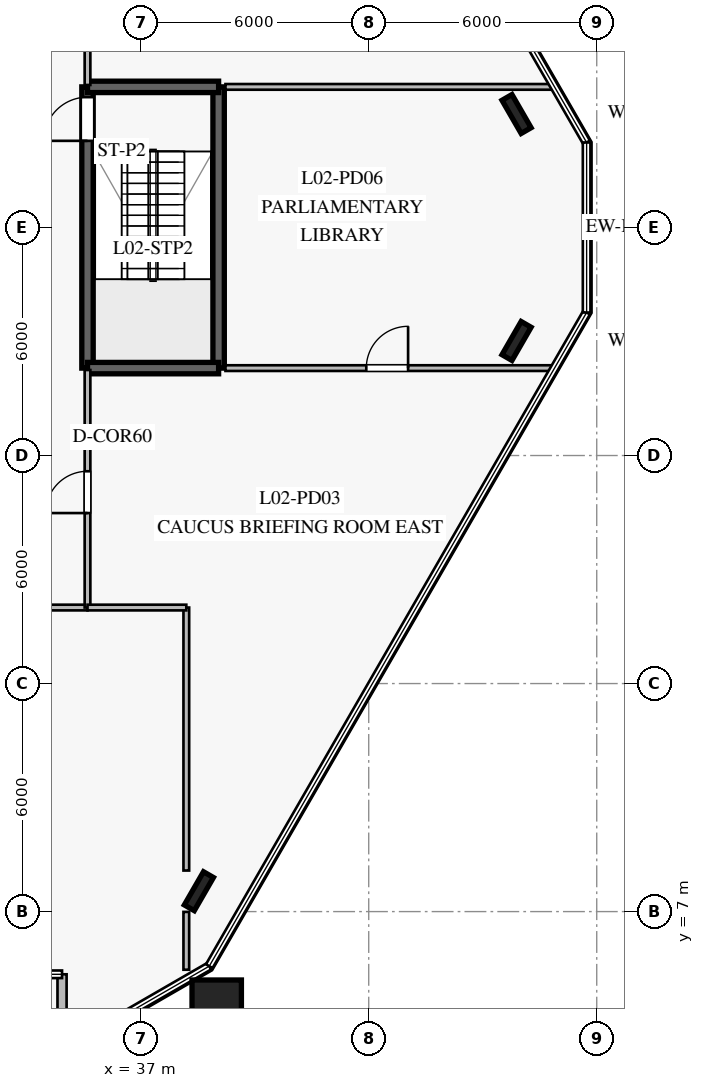
"""IFC4 building model, lengths in metres.
Left out: names, types, materials, properties, quantities, classifications, styles, units other than length and angle.
Written with IfcOpenShell. Run it as: python <this file> out.ifc"""

import sys

from ifc_helpers import new_model, si_unit, direction, frame, frame_2d, origin, origin_2d, place, context, subcontext, project, spatial, rectangle, i_section, extrude, element, fill, save


model = new_model("IFC4")
c1 = context("Model", 3, precision=1e-05, world=origin(), true_north=direction((0.0, 1.0)))
c2 = subcontext(c1, "Body", "Model", "MODEL_VIEW")
j1 = project(units=[si_unit("LENGTHUNIT", "METRE"), si_unit("PLANEANGLEUNIT", "RADIAN")], contexts=[c1])
p1 = place(None, origin())
s1 = spatial("IfcSite", under=j1, at=p1, CompositionType="ELEMENT")
p2 = place(p1, origin())
s2 = spatial("IfcBuilding", under=s1, at=p2, CompositionType="ELEMENT")
p3 = place(p2, frame((0.0, 0.0, 9.8)))
s3 = spatial("IfcBuildingStorey", under=s2, at=p3, CompositionType="ELEMENT", Elevation=9.8)
p4 = place(p3, frame((35.6, 21.3, 0.0), z_axis=(0.0, 0.0, 1.0), x_axis=(0.0, 1.0, 0.0)))
e1 = element("IfcWall", 1, at=p4, inside=s3, PredefinedType="SOLIDWALL", context=c2, shape_type="SweptSolid", body=[
    extrude(rectangle(XDim=7.4, YDim=0.3, at=frame_2d((3.7, 0.0))), origin(), (0.0, 0.0, 1.0), 4.34),
])
p5 = place(p4, frame((5.98, 0.0, 0.0)))
e2 = element("IfcOpeningElement", 2, at=p5, cuts=e1, PredefinedType="OPENING", context=c2, shape_type="SweptSolid", body=[
    extrude(rectangle(XDim=1.15, YDim=2.2, at=frame_2d((0.575, 1.1))), frame((0.0, 0.16, 0.0), z_axis=(0.0, -1.0, 0.0), x_axis=(1.0, 0.0, 0.0)), (0.0, 0.0, 1.0), 0.32),
])
p6 = place(p3, frame((39.05, 21.3, 0.0), z_axis=(0.0, 0.0, 1.0), x_axis=(0.0, 1.0, 0.0)))
e3 = element("IfcWall", 3, at=p6, inside=s3, PredefinedType="SOLIDWALL", context=c2, shape_type="SweptSolid", body=[
    extrude(rectangle(XDim=7.4, YDim=0.3, at=frame_2d((3.7, 0.0))), origin(), (0.0, 0.0, 1.0), 4.34),
])
for number, where, z_axis, x_axis in (
    (4, (35.6, 21.3, 0.0), (0.0, 0.0, 1.0), (1.0, 0.0, 0.0)),
    (5, (35.6, 28.7, 0.0), (0.0, 0.0, 1.0), (1.0, 0.0, 0.0)),
):
    element("IfcWall", number, at=place(p3, frame(where, z_axis=z_axis, x_axis=x_axis)), inside=s3, PredefinedType="SOLIDWALL", context=c2, shape_type="SweptSolid", body=[
        extrude(rectangle(XDim=3.45, YDim=0.3, at=frame_2d((1.725, 0.0))), origin(), (0.0, 0.0, 1.0), 4.34),
    ])
for number, where, z_axis, x_axis in (
    (6, (46.89, 27.986, 0.0), (0.0, 0.0, 1.0), (-0.5, 0.866, 0.0)),
    (7, (38.531, 7.536, 0.0), (0.0, 0.0, 1.0), (0.5, 0.866, 0.0)),
    (8, (46.89, 22.014, 0.0), (0.0, 0.0, 1.0), (0.5, 0.866, 0.0)),
):
    element("IfcColumn", number, at=place(p3, frame(where, z_axis=z_axis, x_axis=x_axis)), inside=s3, PredefinedType="COLUMN", context=c2, shape_type="SweptSolid", body=[
        extrude(i_section(OverallWidth=0.302, OverallDepth=1.008, WebThickness=0.021, FlangeThickness=0.04, at=origin_2d()), origin(), (0.0, 0.0, 1.0), 4.6),
    ])
p7 = place(p3, frame((39.0, 4.55, 0.0), z_axis=(0.0, 0.0, 1.0), x_axis=(1.0, 0.0, 0.0)))
e9 = element("IfcColumn", 9, at=p7, inside=s3, PredefinedType="COLUMN", context=c2, shape_type="SweptSolid", body=[
    extrude(rectangle(XDim=1.3, YDim=1.3, at=origin_2d()), origin(), (0.0, 0.0, 1.0), 4.6),
])
p8 = place(p3, frame((34.93, 5.35, 0.0), z_axis=(0.0, 0.0, 1.0), x_axis=(0.0, -1.0, 0.0)))
e10 = element("IfcWall", 10, at=p8, inside=s3, PredefinedType="STANDARD", context=c2, shape_type="SweptSolid", body=[
    extrude(rectangle(XDim=2.023, YDim=0.24, at=frame_2d((1.012, 0.0))), origin(), (0.0, 0.0, 1.0), 4.34),
])
p9 = place(p3, frame((14.4, 15.0, 0.0), z_axis=(0.0, 0.0, 1.0), x_axis=(1.0, 0.0, 0.0)))
e11 = element("IfcWall", 11, at=p9, inside=s3, PredefinedType="PARTITIONING", context=c2, shape_type="SweptSolid", body=[
    extrude(rectangle(XDim=21.2, YDim=0.15, at=frame_2d((10.6, 0.0))), origin(), (0.0, 0.0, 1.0), 3.79),
])
p10 = place(p9, frame((9.5, 0.0, 0.0)))
e12 = element("IfcOpeningElement", 12, at=p10, cuts=e11, PredefinedType="OPENING", context=c2, shape_type="SweptSolid", body=[
    extrude(rectangle(XDim=2.2, YDim=2.4, at=frame_2d((1.1, 1.2))), frame((0.0, 0.085, 0.0), z_axis=(0.0, -1.0, 0.0), x_axis=(1.0, 0.0, 0.0)), (0.0, 0.0, 1.0), 0.17),
])
p11 = place(p3, frame((35.6, 15.0, 0.0), z_axis=(0.0, 0.0, 1.0), x_axis=(0.0, 1.0, 0.0)))
e13 = element("IfcWall", 13, at=p11, inside=s3, PredefinedType="PARTITIONING", context=c2, shape_type="SweptSolid", body=[
    extrude(rectangle(XDim=6.25, YDim=0.15, at=frame_2d((3.125, 0.0))), origin(), (0.0, 0.0, 1.0), 4.34),
])
p12 = place(p11, frame((2.486, 0.0, 0.0)))
e14 = element("IfcOpeningElement", 14, at=p12, cuts=e13, PredefinedType="OPENING", context=c2, shape_type="SweptSolid", body=[
    extrude(rectangle(XDim=1.1, YDim=2.2, at=frame_2d((0.55, 1.1))), frame((0.0, 0.085, 0.0), z_axis=(0.0, -1.0, 0.0), x_axis=(1.0, 0.0, 0.0)), (0.0, 0.0, 1.0), 0.17),
])
p13 = place(p3, frame((35.6, 28.75, 0.0), z_axis=(0.0, 0.0, 1.0), x_axis=(0.0, 1.0, 0.0)))
e15 = element("IfcWall", 15, at=p13, inside=s3, PredefinedType="PARTITIONING", context=c2, shape_type="SweptSolid", body=[
    extrude(rectangle(XDim=6.25, YDim=0.15, at=frame_2d((3.125, 0.0))), origin(), (0.0, 0.0, 1.0), 3.79),
])
p14 = place(p3, frame((38.2, 5.47, 0.0), z_axis=(0.0, 0.0, 1.0), x_axis=(0.0, 1.0, 0.0)))
e16 = element("IfcWall", 16, at=p14, inside=s3, PredefinedType="PARTITIONING", context=c2, shape_type="SweptSolid", body=[
    extrude(rectangle(XDim=1.522, YDim=0.15, at=frame_2d((0.761, 0.0))), origin(), (0.0, 0.0, 1.0), 3.79),
])
p15 = place(p3, frame((38.2, 8.08, 0.0), z_axis=(0.0, 0.0, 1.0), x_axis=(0.0, 1.0, 0.0)))
e17 = element("IfcWall", 17, at=p15, inside=s3, PredefinedType="PARTITIONING", context=c2, shape_type="SweptSolid", body=[
    extrude(rectangle(XDim=6.92, YDim=0.15, at=frame_2d((3.46, 0.0))), origin(), (0.0, 0.0, 1.0), 3.79),
])
p16 = place(p3, frame((35.6, 15.0, 0.0), z_axis=(0.0, 0.0, 1.0), x_axis=(1.0, 0.0, 0.0)))
e18 = element("IfcWall", 18, at=p16, inside=s3, PredefinedType="PARTITIONING", context=c2, shape_type="SweptSolid", body=[
    extrude(rectangle(XDim=2.6, YDim=0.15, at=frame_2d((1.3, 0.0))), origin(), (0.0, 0.0, 1.0), 4.34),
])
p17 = place(p3, frame((39.23, 21.3, 0.0), z_axis=(0.0, 0.0, 1.0), x_axis=(1.0, 0.0, 0.0)))
e19 = element("IfcWall", 19, at=p17, inside=s3, PredefinedType="PARTITIONING", context=c2, shape_type="SweptSolid", body=[
    extrude(rectangle(XDim=8.69, YDim=0.15, at=frame_2d((4.345, 0.0))), origin(), (0.0, 0.0, 1.0), 3.64),
])
p18 = place(p17, frame((3.706, 0.0, 0.0)))
e20 = element("IfcOpeningElement", 20, at=p18, cuts=e19, PredefinedType="OPENING", context=c2, shape_type="SweptSolid", body=[
    extrude(rectangle(XDim=1.1, YDim=2.2, at=frame_2d((0.55, 1.1))), frame((0.0, 0.085, 0.0), z_axis=(0.0, -1.0, 0.0), x_axis=(1.0, 0.0, 0.0)), (0.0, 0.0, 1.0), 0.17),
])
p19 = place(p3, frame((39.23, 28.7, 0.0), z_axis=(0.0, 0.0, 1.0), x_axis=(1.0, 0.0, 0.0)))
e21 = element("IfcWall", 21, at=p19, inside=s3, PredefinedType="PARTITIONING", context=c2, shape_type="SweptSolid", body=[
    extrude(rectangle(XDim=8.69, YDim=0.15, at=frame_2d((4.345, 0.0))), origin(), (0.0, 0.0, 1.0), 3.64),
])
p20 = place(p5, origin())
e22 = element("IfcDoor", 22, at=p20, inside=s3, OperationType="SINGLE_SWING_LEFT", PredefinedType="DOOR", context=c2, shape_type="SweptSolid", body=[
    extrude(rectangle(XDim=1.15, YDim=2.2, at=frame_2d((0.575, 1.1))), frame((0.0, 0.025, 0.0), z_axis=(0.0, -1.0, 0.0), x_axis=(1.0, 0.0, 0.0)), (0.0, 0.0, 1.0), 0.05),
])
fill(e2, e22)
p21 = place(p12, origin())
e23 = element("IfcDoor", 23, at=p21, inside=s3, OperationType="SINGLE_SWING_LEFT", PredefinedType="DOOR", context=c2, shape_type="SweptSolid", body=[
    extrude(rectangle(XDim=1.1, YDim=2.2, at=frame_2d((0.55, 1.1))), frame((0.0, 0.025, 0.0), z_axis=(0.0, -1.0, 0.0), x_axis=(1.0, 0.0, 0.0)), (0.0, 0.0, 1.0), 0.05),
])
fill(e14, e23)
p22 = place(p18, origin())
e24 = element("IfcDoor", 24, at=p22, inside=s3, OperationType="SINGLE_SWING_RIGHT", PredefinedType="DOOR", context=c2, shape_type="SweptSolid", body=[
    extrude(rectangle(XDim=1.1, YDim=2.2, at=frame_2d((0.55, 1.1))), frame((0.0, 0.025, 0.0), z_axis=(0.0, -1.0, 0.0), x_axis=(1.0, 0.0, 0.0)), (0.0, 0.0, 1.0), 0.05),
])
fill(e20, e24)
save(model, sys.argv[1])
